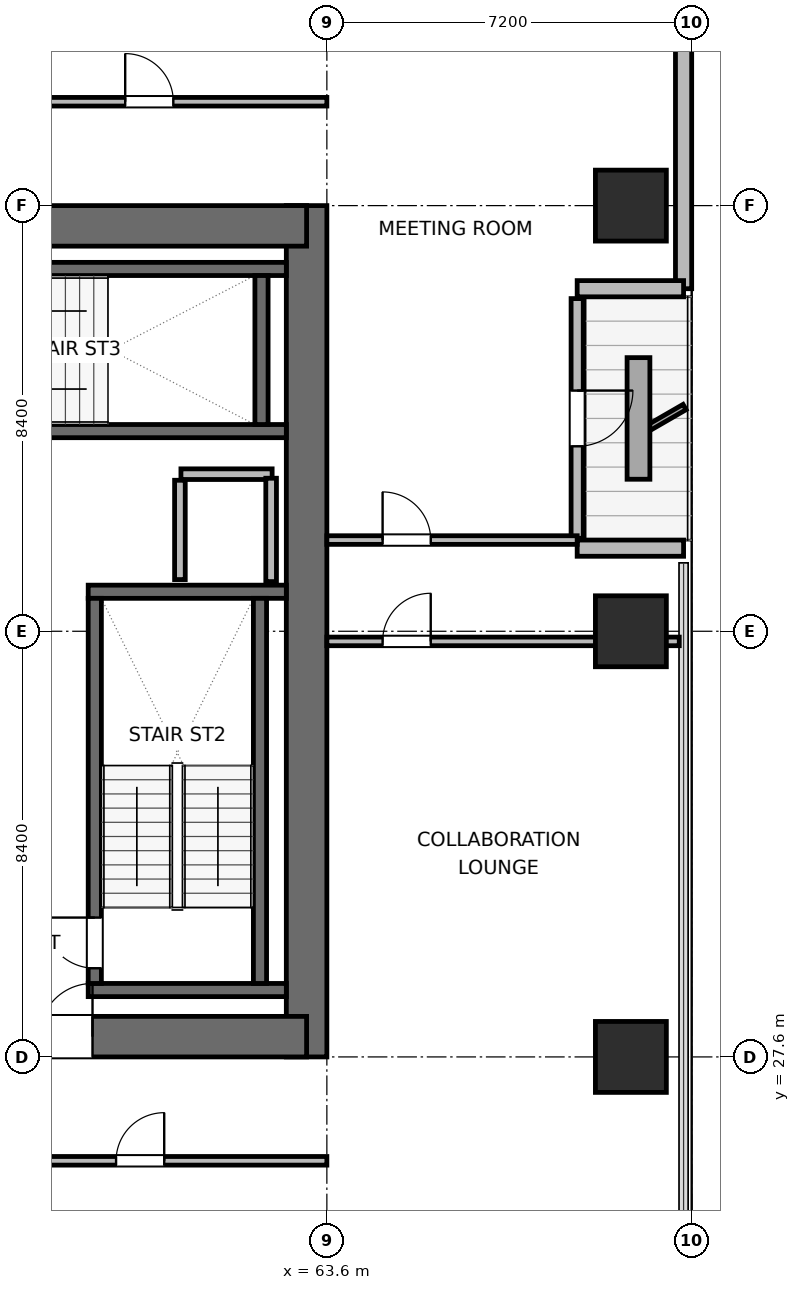
"""IFC4 building model, lengths in metres.
Left out: names, types, materials, properties, quantities, classifications, styles, units other than length and angle.
Written with IfcOpenShell. Run it as: python <this file> out.ifc"""

import sys

from ifc_helpers import new_model, si_unit, direction, frame, frame_2d, origin, origin_2d, place, context, subcontext, project, spatial, rectangle, extrude, element, fill, save


model = new_model("IFC4")
c1 = context("Model", 3, precision=1e-05, world=origin(), true_north=direction((0.0, 1.0)))
c2 = subcontext(c1, "Body", "Model", "MODEL_VIEW")
j1 = project(units=[si_unit("LENGTHUNIT", "METRE"), si_unit("PLANEANGLEUNIT", "RADIAN")], contexts=[c1])
p1 = place(None, origin())
s1 = spatial("IfcSite", under=j1, at=p1, CompositionType="ELEMENT")
p2 = place(p1, origin())
s2 = spatial("IfcBuilding", under=s1, at=p2, CompositionType="ELEMENT")
p3 = place(p2, frame((0.0, 0.0, 133.8)))
s3 = spatial("IfcBuildingStorey", under=s2, at=p3, CompositionType="ELEMENT", Elevation=133.8)
p4 = place(p3, frame((63.2, 27.6, 0.0), z_axis=(0.0, 0.0, 1.0), x_axis=(0.0, 1.0, 0.0)))
e1 = element("IfcWall", 1, at=p4, inside=s3, PredefinedType="SHEAR", context=c2, shape_type="SweptSolid", body=[
    extrude(rectangle(XDim=16.8, YDim=0.8, at=frame_2d((8.4, 0.0))), origin(), (0.0, 0.0, 1.0), 3.9),
])
p5 = place(p3, frame((54.0, 28.0, 0.0), z_axis=(0.0, 0.0, 1.0), x_axis=(1.0, 0.0, 0.0)))
e2 = element("IfcWall", 2, at=p5, inside=s3, PredefinedType="SHEAR", context=c2, shape_type="SweptSolid", body=[
    extrude(rectangle(XDim=9.2, YDim=0.8, at=frame_2d((4.6, 0.0))), origin(), (0.0, 0.0, 1.0), 3.9),
])
p6 = place(p5, frame((3.925, 0.0, 0.0)))
e3 = element("IfcOpeningElement", 3, at=p6, cuts=e2, PredefinedType="OPENING", context=c2, shape_type="SweptSolid", body=[
    extrude(rectangle(XDim=1.05, YDim=2.04, at=frame_2d((0.525, 1.02))), frame((0.0, 0.41, 0.0), z_axis=(0.0, -1.0, 0.0), x_axis=(1.0, 0.0, 0.0)), (0.0, 0.0, 1.0), 0.82),
])
p7 = place(p3, frame((54.0, 44.0, 0.0), z_axis=(0.0, 0.0, 1.0), x_axis=(1.0, 0.0, 0.0)))
e4 = element("IfcWall", 4, at=p7, inside=s3, PredefinedType="SHEAR", context=c2, shape_type="SweptSolid", body=[
    extrude(rectangle(XDim=9.2, YDim=0.8, at=frame_2d((4.6, 0.0))), origin(), (0.0, 0.0, 1.0), 3.9),
])
for number, where, z_axis, x_axis in (
    (5, (58.89, 28.92, 0.0), (0.0, 0.0, 1.0), (1.0, 0.0, 0.0)),
    (6, (58.89, 36.78, 0.0), (0.0, 0.0, 1.0), (1.0, 0.0, 0.0)),
):
    element("IfcWall", number, at=place(p3, frame(where, z_axis=z_axis, x_axis=x_axis)), inside=s3, PredefinedType="SHEAR", context=c2, shape_type="SweptSolid", body=[
        extrude(rectangle(XDim=3.91, YDim=0.26, at=frame_2d((1.955, 0.0))), origin(), (0.0, 0.0, 1.0), 3.9),
    ])
p8 = place(p3, frame((59.02, 29.05, 0.0), z_axis=(0.0, 0.0, 1.0), x_axis=(0.0, 1.0, 0.0)))
e7 = element("IfcWall", 7, at=p8, inside=s3, PredefinedType="SHEAR", context=c2, shape_type="SweptSolid", body=[
    extrude(rectangle(XDim=7.6, YDim=0.26, at=frame_2d((3.8, 0.0))), origin(), (0.0, 0.0, 1.0), 3.9),
])
p9 = place(p8, frame((0.3, 0.0, 0.0)))
e8 = element("IfcOpeningElement", 8, at=p9, cuts=e7, PredefinedType="OPENING", context=c2, shape_type="SweptSolid", body=[
    extrude(rectangle(XDim=1.0, YDim=2.04, at=frame_2d((0.5, 1.02))), frame((0.0, 0.14, 0.0), z_axis=(0.0, -1.0, 0.0), x_axis=(1.0, 0.0, 0.0)), (0.0, 0.0, 1.0), 0.28),
])
p10 = place(p3, frame((62.28, 29.05, 0.0), z_axis=(0.0, 0.0, 1.0), x_axis=(0.0, 1.0, 0.0)))
e9 = element("IfcWall", 9, at=p10, inside=s3, PredefinedType="SHEAR", context=c2, shape_type="SweptSolid", body=[
    extrude(rectangle(XDim=7.6, YDim=0.26, at=frame_2d((3.8, 0.0))), origin(), (0.0, 0.0, 1.0), 3.9),
])
p11 = place(p3, frame((54.4, 39.95, 0.0), z_axis=(0.0, 0.0, 1.0), x_axis=(1.0, 0.0, 0.0)))
e10 = element("IfcWall", 10, at=p11, inside=s3, PredefinedType="SHEAR", context=c2, shape_type="SweptSolid", body=[
    extrude(rectangle(XDim=8.4, YDim=0.26, at=frame_2d((4.2, 0.0))), origin(), (0.0, 0.0, 1.0), 3.9),
])
p12 = place(p11, frame((0.8, 0.0, 0.0)))
e11 = element("IfcOpeningElement", 11, at=p12, cuts=e10, PredefinedType="OPENING", context=c2, shape_type="SweptSolid", body=[
    extrude(rectangle(XDim=1.0, YDim=2.04, at=frame_2d((0.5, 1.02))), frame((0.0, 0.14, 0.0), z_axis=(0.0, -1.0, 0.0), x_axis=(1.0, 0.0, 0.0)), (0.0, 0.0, 1.0), 0.28),
])
p13 = place(p3, frame((54.4, 43.15, 0.0), z_axis=(0.0, 0.0, 1.0), x_axis=(1.0, 0.0, 0.0)))
e12 = element("IfcWall", 12, at=p13, inside=s3, PredefinedType="SHEAR", context=c2, shape_type="SweptSolid", body=[
    extrude(rectangle(XDim=8.4, YDim=0.26, at=frame_2d((4.2, 0.0))), origin(), (0.0, 0.0, 1.0), 3.9),
])
p14 = place(p3, frame((62.31, 40.08, 0.0), z_axis=(0.0, 0.0, 1.0), x_axis=(0.0, 1.0, 0.0)))
e13 = element("IfcWall", 13, at=p14, inside=s3, PredefinedType="SHEAR", context=c2, shape_type="SweptSolid", body=[
    extrude(rectangle(XDim=2.94, YDim=0.26, at=frame_2d((1.47, 0.0))), origin(), (0.0, 0.0, 1.0), 3.9),
])
for number, where, z_axis, x_axis in (
    (14, (69.6, 27.6, 0.0), (0.0, 0.0, 1.0), (1.0, 0.0, 0.0)),
    (15, (69.6, 36.0, 0.0), (0.0, 0.0, 1.0), (1.0, 0.0, 0.0)),
    (16, (69.6, 44.4, 0.0), (0.0, 0.0, 1.0), (1.0, 0.0, 0.0)),
):
    element("IfcColumn", number, at=place(p3, frame(where, z_axis=z_axis, x_axis=x_axis)), inside=s3, PredefinedType="COLUMN", context=c2, shape_type="SweptSolid", body=[
        extrude(rectangle(XDim=1.4, YDim=1.4, at=origin_2d()), origin(), (0.0, 0.0, 1.0), 3.9),
    ])
p15 = place(p3, frame((70.64, 56.979, 0.0), z_axis=(0.0, 0.0, 1.0), x_axis=(0.0, -1.0, 0.0)))
e17 = element("IfcWall", 17, at=p15, inside=s3, PredefinedType="SOLIDWALL", context=c2, shape_type="SweptSolid", body=[
    extrude(rectangle(XDim=14.219, YDim=0.32, at=frame_2d((7.109, 0.0))), origin(), (0.0, 0.0, 1.0), 3.64),
])
p16 = place(p3, frame((70.64, 42.76, 0.0), z_axis=(0.0, 0.0, 1.0), x_axis=(-1.0, 0.0, 0.0)))
e18 = element("IfcWall", 18, at=p16, inside=s3, PredefinedType="SOLIDWALL", context=c2, shape_type="SweptSolid", body=[
    extrude(rectangle(XDim=2.1, YDim=0.32, at=frame_2d((1.05, 0.0))), origin(), (0.0, 0.0, 1.0), 2.875),
])
p17 = place(p3, frame((68.54, 42.565, 0.0), z_axis=(0.0, 0.0, 1.0), x_axis=(0.0, -1.0, 0.0)))
e19 = element("IfcWall", 19, at=p17, inside=s3, PredefinedType="SOLIDWALL", context=c2, shape_type="SweptSolid", body=[
    extrude(rectangle(XDim=4.73, YDim=0.24, at=frame_2d((2.365, 0.0))), origin(), (0.0, 0.0, 1.0), 3.162),
])
p18 = place(p17, frame((1.815, 0.0, 0.0)))
e20 = element("IfcOpeningElement", 20, at=p18, cuts=e19, PredefinedType="OPENING", context=c2, shape_type="SweptSolid", body=[
    extrude(rectangle(XDim=1.1, YDim=2.04, at=frame_2d((0.55, 1.02))), frame((0.0, 0.13, 0.0), z_axis=(0.0, -1.0, 0.0), x_axis=(1.0, 0.0, 0.0)), (0.0, 0.0, 1.0), 0.26),
])
p19 = place(p3, frame((68.54, 37.64, 0.0), z_axis=(0.0, 0.0, 1.0), x_axis=(1.0, 0.0, 0.0)))
e21 = element("IfcWall", 21, at=p19, inside=s3, PredefinedType="SOLIDWALL", context=c2, shape_type="SweptSolid", body=[
    extrude(rectangle(XDim=2.1, YDim=0.32, at=frame_2d((1.05, 0.0))), origin(), (0.0, 0.0, 1.0), 2.875),
])
p20 = place(p3, frame((60.72, 39.1, 0.0), z_axis=(0.0, 0.0, 1.0), x_axis=(1.0, 0.0, 0.0)))
e22 = element("IfcWall", 22, at=p20, inside=s3, PredefinedType="PARTITIONING", context=c2, shape_type="SweptSolid", body=[
    extrude(rectangle(XDim=1.8, YDim=0.21, at=frame_2d((0.9, 0.0))), origin(), (0.0, 0.0, 1.0), 3.64),
])
p21 = place(p3, frame((60.7, 37.02, 0.0), z_axis=(0.0, 0.0, 1.0), x_axis=(0.0, 1.0, 0.0)))
e23 = element("IfcWall", 23, at=p21, inside=s3, PredefinedType="PARTITIONING", context=c2, shape_type="SweptSolid", body=[
    extrude(rectangle(XDim=1.96, YDim=0.21, at=frame_2d((0.98, 0.0))), origin(), (0.0, 0.0, 1.0), 3.64),
])
p22 = place(p3, frame((62.5, 36.98, 0.0), z_axis=(0.0, 0.0, 1.0), x_axis=(0.0, 1.0, 0.0)))
e24 = element("IfcWall", 24, at=p22, inside=s3, PredefinedType="PARTITIONING", context=c2, shape_type="SweptSolid", body=[
    extrude(rectangle(XDim=2.04, YDim=0.21, at=frame_2d((1.02, 0.0))), origin(), (0.0, 0.0, 1.0), 3.64),
])
p23 = place(p3, frame((30.35, 25.55, 0.0), z_axis=(0.0, 0.0, 1.0), x_axis=(1.0, 0.0, 0.0)))
e25 = element("IfcWall", 25, at=p23, inside=s3, PredefinedType="PARTITIONING", context=c2, shape_type="SweptSolid", body=[
    extrude(rectangle(XDim=33.25, YDim=0.17, at=frame_2d((16.625, 0.0))), origin(), (0.0, 0.0, 1.0), 3.64),
])
p24 = place(p23, frame((3.21, 0.0, 0.0)))
e26 = element("IfcOpeningElement", 26, at=p24, cuts=e25, PredefinedType="OPENING", context=c2, shape_type="SweptSolid", body=[
    extrude(rectangle(XDim=0.95, YDim=2.04, at=frame_2d((0.475, 1.02))), frame((0.0, 0.095, 0.0), z_axis=(0.0, -1.0, 0.0), x_axis=(1.0, 0.0, 0.0)), (0.0, 0.0, 1.0), 0.19),
])
p25 = place(p23, frame((9.98, 0.0, 0.0)))
e27 = element("IfcOpeningElement", 27, at=p25, cuts=e25, PredefinedType="OPENING", context=c2, shape_type="SweptSolid", body=[
    extrude(rectangle(XDim=0.95, YDim=2.04, at=frame_2d((0.475, 1.02))), frame((0.0, 0.095, 0.0), z_axis=(0.0, -1.0, 0.0), x_axis=(1.0, 0.0, 0.0)), (0.0, 0.0, 1.0), 0.19),
])
p26 = place(p23, frame((16.15, 0.0, 0.0)))
e28 = element("IfcOpeningElement", 28, at=p26, cuts=e25, PredefinedType="OPENING", context=c2, shape_type="SweptSolid", body=[
    extrude(rectangle(XDim=0.95, YDim=2.04, at=frame_2d((0.475, 1.02))), frame((0.0, 0.095, 0.0), z_axis=(0.0, -1.0, 0.0), x_axis=(1.0, 0.0, 0.0)), (0.0, 0.0, 1.0), 0.19),
])
p27 = place(p23, frame((22.32, 0.0, 0.0)))
e29 = element("IfcOpeningElement", 29, at=p27, cuts=e25, PredefinedType="OPENING", context=c2, shape_type="SweptSolid", body=[
    extrude(rectangle(XDim=0.95, YDim=2.04, at=frame_2d((0.475, 1.02))), frame((0.0, 0.095, 0.0), z_axis=(0.0, -1.0, 0.0), x_axis=(1.0, 0.0, 0.0)), (0.0, 0.0, 1.0), 0.19),
])
p28 = place(p23, frame((29.09, 0.0, 0.0)))
e30 = element("IfcOpeningElement", 30, at=p28, cuts=e25, PredefinedType="OPENING", context=c2, shape_type="SweptSolid", body=[
    extrude(rectangle(XDim=0.95, YDim=2.04, at=frame_2d((0.475, 1.02))), frame((0.0, 0.095, 0.0), z_axis=(0.0, -1.0, 0.0), x_axis=(1.0, 0.0, 0.0)), (0.0, 0.0, 1.0), 0.19),
])
p29 = place(p3, frame((30.35, 46.45, 0.0), z_axis=(0.0, 0.0, 1.0), x_axis=(1.0, 0.0, 0.0)))
e31 = element("IfcWall", 31, at=p29, inside=s3, PredefinedType="PARTITIONING", context=c2, shape_type="SweptSolid", body=[
    extrude(rectangle(XDim=33.25, YDim=0.17, at=frame_2d((16.625, 0.0))), origin(), (0.0, 0.0, 1.0), 3.64),
])
p30 = place(p29, frame((3.03, 0.0, 0.0)))
e32 = element("IfcOpeningElement", 32, at=p30, cuts=e31, PredefinedType="OPENING", context=c2, shape_type="SweptSolid", body=[
    extrude(rectangle(XDim=0.95, YDim=2.04, at=frame_2d((0.475, 1.02))), frame((0.0, 0.095, 0.0), z_axis=(0.0, -1.0, 0.0), x_axis=(1.0, 0.0, 0.0)), (0.0, 0.0, 1.0), 0.19),
])
p31 = place(p29, frame((10.09, 0.0, 0.0)))
e33 = element("IfcOpeningElement", 33, at=p31, cuts=e31, PredefinedType="OPENING", context=c2, shape_type="SweptSolid", body=[
    extrude(rectangle(XDim=0.95, YDim=2.04, at=frame_2d((0.475, 1.02))), frame((0.0, 0.095, 0.0), z_axis=(0.0, -1.0, 0.0), x_axis=(1.0, 0.0, 0.0)), (0.0, 0.0, 1.0), 0.19),
])
p32 = place(p29, frame((15.1, 0.0, 0.0)))
e34 = element("IfcOpeningElement", 34, at=p32, cuts=e31, PredefinedType="OPENING", context=c2, shape_type="SweptSolid", body=[
    extrude(rectangle(XDim=0.95, YDim=2.04, at=frame_2d((0.475, 1.02))), frame((0.0, 0.095, 0.0), z_axis=(0.0, -1.0, 0.0), x_axis=(1.0, 0.0, 0.0)), (0.0, 0.0, 1.0), 0.19),
])
p33 = place(p29, frame((21.16, 0.0, 0.0)))
e35 = element("IfcOpeningElement", 35, at=p33, cuts=e31, PredefinedType="OPENING", context=c2, shape_type="SweptSolid", body=[
    extrude(rectangle(XDim=0.95, YDim=2.04, at=frame_2d((0.475, 1.02))), frame((0.0, 0.095, 0.0), z_axis=(0.0, -1.0, 0.0), x_axis=(1.0, 0.0, 0.0)), (0.0, 0.0, 1.0), 0.19),
])
p34 = place(p29, frame((29.27, 0.0, 0.0)))
e36 = element("IfcOpeningElement", 36, at=p34, cuts=e31, PredefinedType="OPENING", context=c2, shape_type="SweptSolid", body=[
    extrude(rectangle(XDim=0.95, YDim=2.04, at=frame_2d((0.475, 1.02))), frame((0.0, 0.095, 0.0), z_axis=(0.0, -1.0, 0.0), x_axis=(1.0, 0.0, 0.0)), (0.0, 0.0, 1.0), 0.19),
])
p35 = place(p3, frame((63.6, 35.8, 0.0), z_axis=(0.0, 0.0, 1.0), x_axis=(1.0, 0.0, 0.0)))
e37 = element("IfcWall", 37, at=p35, inside=s3, PredefinedType="PARTITIONING", context=c2, shape_type="SweptSolid", body=[
    extrude(rectangle(XDim=6.955, YDim=0.17, at=frame_2d((3.478, 0.0))), origin(), (0.0, 0.0, 1.0), 3.003),
])
p36 = place(p35, frame((1.1, 0.0, 0.0)))
e38 = element("IfcOpeningElement", 38, at=p36, cuts=e37, PredefinedType="OPENING", context=c2, shape_type="SweptSolid", body=[
    extrude(rectangle(XDim=0.95, YDim=2.04, at=frame_2d((0.475, 1.02))), frame((0.0, 0.095, 0.0), z_axis=(0.0, -1.0, 0.0), x_axis=(1.0, 0.0, 0.0)), (0.0, 0.0, 1.0), 0.19),
])
p37 = place(p3, frame((63.6, 37.8, 0.0), z_axis=(0.0, 0.0, 1.0), x_axis=(1.0, 0.0, 0.0)))
e39 = element("IfcWall", 39, at=p37, inside=s3, PredefinedType="PARTITIONING", context=c2, shape_type="SweptSolid", body=[
    extrude(rectangle(XDim=4.94, YDim=0.17, at=frame_2d((2.47, 0.0))), origin(), (0.0, 0.0, 1.0), 3.64),
])
p38 = place(p37, frame((1.1, 0.0, 0.0)))
e40 = element("IfcOpeningElement", 40, at=p38, cuts=e39, PredefinedType="OPENING", context=c2, shape_type="SweptSolid", body=[
    extrude(rectangle(XDim=0.95, YDim=2.04, at=frame_2d((0.475, 1.02))), frame((0.0, 0.095, 0.0), z_axis=(0.0, -1.0, 0.0), x_axis=(1.0, 0.0, 0.0)), (0.0, 0.0, 1.0), 0.19),
])
p39 = place(p18, origin())
e41 = element("IfcDoor", 41, at=p39, inside=s3, OperationType="SINGLE_SWING_LEFT", PredefinedType="DOOR", context=c2, shape_type="SweptSolid", body=[
    extrude(rectangle(XDim=1.1, YDim=2.04, at=frame_2d((0.55, 1.02))), frame((0.0, 0.025, 0.0), z_axis=(0.0, -1.0, 0.0), x_axis=(1.0, 0.0, 0.0)), (0.0, 0.0, 1.0), 0.05),
])
fill(e20, e41)
p40 = place(p9, origin())
e42 = element("IfcDoor", 42, at=p40, inside=s3, OperationType="SINGLE_SWING_RIGHT", PredefinedType="DOOR", context=c2, shape_type="SweptSolid", body=[
    extrude(rectangle(XDim=1.0, YDim=2.04, at=frame_2d((0.5, 1.02))), frame((0.0, 0.025, 0.0), z_axis=(0.0, -1.0, 0.0), x_axis=(1.0, 0.0, 0.0)), (0.0, 0.0, 1.0), 0.05),
])
fill(e8, e42)
p41 = place(p6, origin())
e43 = element("IfcDoor", 43, at=p41, inside=s3, OperationType="SINGLE_SWING_RIGHT", PredefinedType="DOOR", context=c2, shape_type="SweptSolid", body=[
    extrude(rectangle(XDim=1.05, YDim=2.04, at=frame_2d((0.525, 1.02))), frame((0.0, 0.025, 0.0), z_axis=(0.0, -1.0, 0.0), x_axis=(1.0, 0.0, 0.0)), (0.0, 0.0, 1.0), 0.05),
])
fill(e3, e43)
p42 = place(p28, origin())
e44 = element("IfcDoor", 44, at=p42, inside=s3, OperationType="SINGLE_SWING_RIGHT", PredefinedType="DOOR", context=c2, shape_type="SweptSolid", body=[
    extrude(rectangle(XDim=0.95, YDim=2.04, at=frame_2d((0.475, 1.02))), frame((0.0, 0.025, 0.0), z_axis=(0.0, -1.0, 0.0), x_axis=(1.0, 0.0, 0.0)), (0.0, 0.0, 1.0), 0.05),
])
fill(e30, e44)
p43 = place(p34, origin())
e45 = element("IfcDoor", 45, at=p43, inside=s3, OperationType="SINGLE_SWING_LEFT", PredefinedType="DOOR", context=c2, shape_type="SweptSolid", body=[
    extrude(rectangle(XDim=0.95, YDim=2.04, at=frame_2d((0.475, 1.02))), frame((0.0, 0.025, 0.0), z_axis=(0.0, -1.0, 0.0), x_axis=(1.0, 0.0, 0.0)), (0.0, 0.0, 1.0), 0.05),
])
fill(e36, e45)
p44 = place(p36, origin())
e46 = element("IfcDoor", 46, at=p44, inside=s3, OperationType="SINGLE_SWING_RIGHT", PredefinedType="DOOR", context=c2, shape_type="SweptSolid", body=[
    extrude(rectangle(XDim=0.95, YDim=2.04, at=frame_2d((0.475, 1.02))), frame((0.0, 0.025, 0.0), z_axis=(0.0, -1.0, 0.0), x_axis=(1.0, 0.0, 0.0)), (0.0, 0.0, 1.0), 0.05),
])
fill(e38, e46)
p45 = place(p38, origin())
e47 = element("IfcDoor", 47, at=p45, inside=s3, OperationType="SINGLE_SWING_LEFT", PredefinedType="DOOR", context=c2, shape_type="SweptSolid", body=[
    extrude(rectangle(XDim=0.95, YDim=2.04, at=frame_2d((0.475, 1.02))), frame((0.0, 0.025, 0.0), z_axis=(0.0, -1.0, 0.0), x_axis=(1.0, 0.0, 0.0)), (0.0, 0.0, 1.0), 0.05),
])
fill(e40, e47)
save(model, sys.argv[1])
